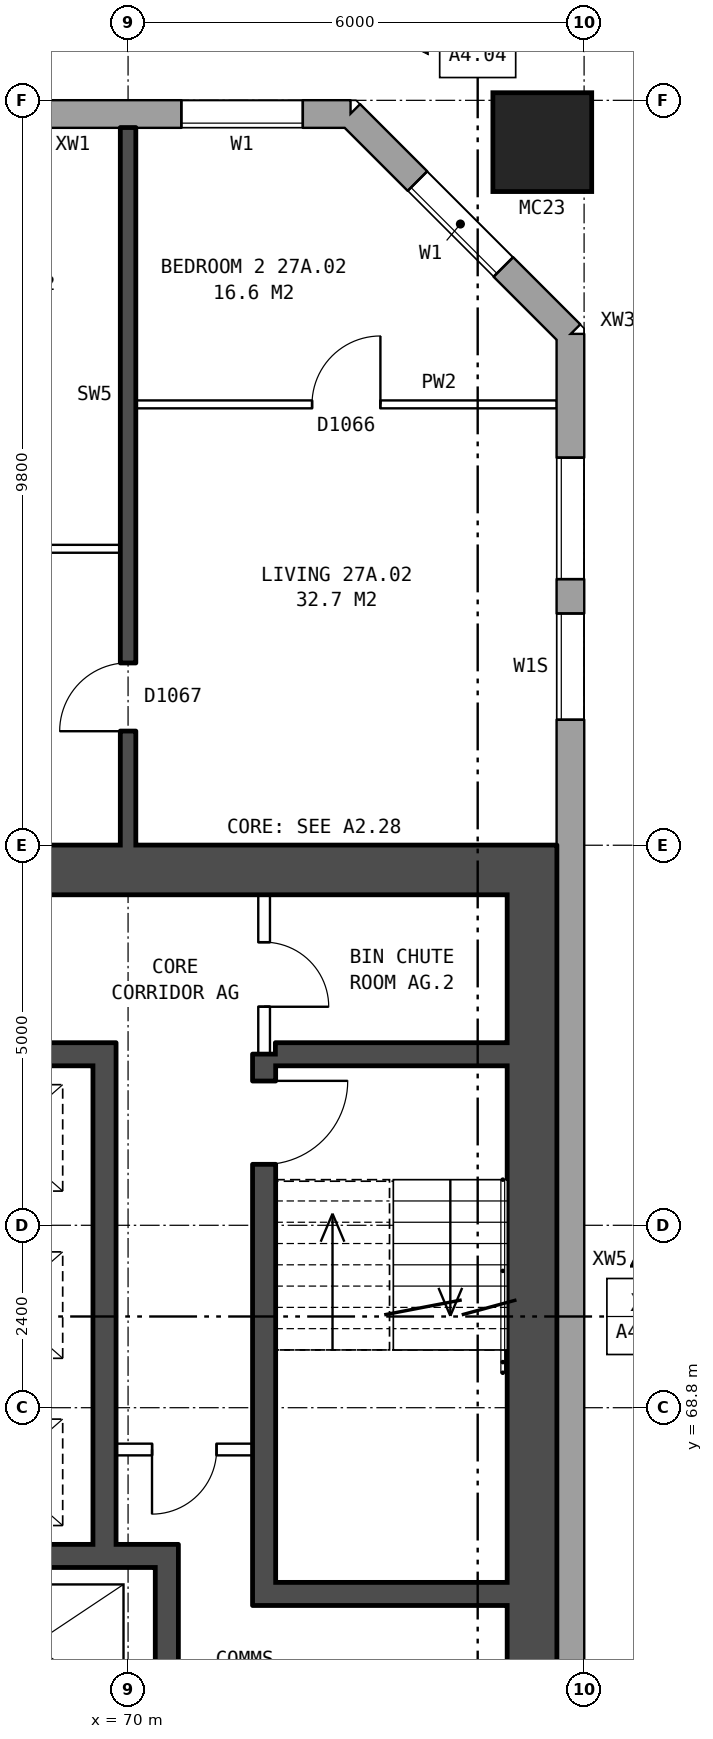
"""IFC4 building model, lengths in metres.
Left out: names, types, materials, properties, quantities, classifications, styles, units other than length and angle.
Written with IfcOpenShell. Run it as: python <this file> out.ifc"""

import sys

from ifc_helpers import new_model, si_unit, direction, frame, frame_2d, origin, origin_2d, place, context, subcontext, project, spatial, rectangle, hollow_rectangle, extrude, element, fill, save


model = new_model("IFC4")
c1 = context("Model", 3, precision=1e-05, world=origin(), true_north=direction((0.0, 1.0)))
c2 = subcontext(c1, "Body", "Model", "MODEL_VIEW")
j1 = project(units=[si_unit("LENGTHUNIT", "METRE"), si_unit("PLANEANGLEUNIT", "RADIAN")], contexts=[c1])
p1 = place(None, origin())
s1 = spatial("IfcSite", under=j1, at=p1, CompositionType="ELEMENT")
p2 = place(p1, origin())
s2 = spatial("IfcBuilding", under=s1, at=p2, CompositionType="ELEMENT")
p3 = place(p2, frame((0.0, 0.0, 99.5)))
s3 = spatial("IfcBuildingStorey", under=s2, at=p3, CompositionType="ELEMENT", Elevation=99.5)
p4 = place(p3, frame((75.45, 85.45, 0.0), z_axis=(0.0, 0.0, 1.0), x_axis=(1.0, 0.0, 0.0)))
e1 = element("IfcColumn", 1, at=p4, inside=s3, PredefinedType="COLUMN", context=c2, shape_type="SweptSolid", body=[
    extrude(hollow_rectangle(XDim=1.3, YDim=1.3, WallThickness=0.07, at=origin_2d()), origin(), (0.0, 0.0, 1.0), 3.1),
])
p5 = place(p3, frame((75.82, 57.075, 0.0), z_axis=(0.0, 0.0, 1.0), x_axis=(0.0, 1.0, 0.0)))
e2 = element("IfcWall", 2, at=p5, inside=s3, PredefinedType="STANDARD", context=c2, shape_type="SweptSolid", body=[
    extrude(rectangle(XDim=25.851, YDim=0.36, at=frame_2d((12.925, 0.0))), origin(), (0.0, 0.0, 1.0), 2.85),
])
p6 = place(p5, frame((1.625, 0.0, 0.8)))
e3 = element("IfcOpeningElement", 3, at=p6, cuts=e2, PredefinedType="OPENING", context=c2, shape_type="SweptSolid", body=[
    extrude(rectangle(XDim=1.6, YDim=1.8, at=frame_2d((0.8, 0.9))), frame((0.0, 0.19, 0.0), z_axis=(0.0, -1.0, 0.0), x_axis=(1.0, 0.0, 0.0)), (0.0, 0.0, 1.0), 0.38),
])
p7 = place(p5, frame((4.075, 0.0, 1.65)))
e4 = element("IfcOpeningElement", 4, at=p7, cuts=e2, PredefinedType="OPENING", context=c2, shape_type="SweptSolid", body=[
    extrude(rectangle(XDim=0.8, YDim=0.9, at=frame_2d((0.4, 0.45))), frame((0.0, 0.19, 0.0), z_axis=(0.0, -1.0, 0.0), x_axis=(1.0, 0.0, 0.0)), (0.0, 0.0, 1.0), 0.38),
])
p8 = place(p5, frame((20.775, 0.0, 1.7)))
e5 = element("IfcOpeningElement", 5, at=p8, cuts=e2, PredefinedType="OPENING", context=c2, shape_type="SweptSolid", body=[
    extrude(rectangle(XDim=1.4, YDim=0.9, at=frame_2d((0.7, 0.45))), frame((0.0, 0.19, 0.0), z_axis=(0.0, -1.0, 0.0), x_axis=(1.0, 0.0, 0.0)), (0.0, 0.0, 1.0), 0.38),
])
p9 = place(p5, frame((22.625, 0.0, 0.8)))
e6 = element("IfcOpeningElement", 6, at=p9, cuts=e2, PredefinedType="OPENING", context=c2, shape_type="SweptSolid", body=[
    extrude(rectangle(XDim=1.6, YDim=1.8, at=frame_2d((0.8, 0.9))), frame((0.0, 0.19, 0.0), z_axis=(0.0, -1.0, 0.0), x_axis=(1.0, 0.0, 0.0)), (0.0, 0.0, 1.0), 0.38),
])
p10 = place(p5, frame((5.575, 0.0, 0.45)))
e7 = element("IfcOpeningElement", 7, at=p10, cuts=e2, PredefinedType="OPENING", context=c2, shape_type="SweptSolid", body=[
    extrude(rectangle(XDim=1.0, YDim=0.9, at=frame_2d((0.5, 0.45))), frame((0.0, 0.19, 0.0), z_axis=(0.0, -1.0, 0.0), x_axis=(1.0, 0.0, 0.0)), (0.0, 0.0, 1.0), 0.38),
])
p11 = place(p3, frame((75.82, 82.925, 0.0), z_axis=(0.0, 0.0, 1.0), x_axis=(-0.707106781187, 0.707106781187, 0.0)))
e8 = element("IfcWall", 8, at=p11, inside=s3, PredefinedType="STANDARD", context=c2, shape_type="SweptSolid", body=[
    extrude(rectangle(XDim=4.094, YDim=0.36, at=frame_2d((2.047, 0.0))), origin(), (0.0, 0.0, 1.0), 2.85),
])
p12 = place(p11, frame((1.247, 0.0, 0.8)))
e9 = element("IfcOpeningElement", 9, at=p12, cuts=e8, PredefinedType="OPENING", context=c2, shape_type="SweptSolid", body=[
    extrude(rectangle(XDim=1.6, YDim=1.8, at=frame_2d((0.8, 0.9))), frame((0.0, 0.19, 0.0), z_axis=(0.0, -1.0, 0.0), x_axis=(1.0, 0.0, 0.0)), (0.0, 0.0, 1.0), 0.38),
])
p13 = place(p3, frame((72.925, 85.82, 0.0), z_axis=(0.0, 0.0, 1.0), x_axis=(-1.0, 0.0, 0.0)))
e10 = element("IfcWall", 10, at=p13, inside=s3, PredefinedType="STANDARD", context=c2, shape_type="SweptSolid", body=[
    extrude(rectangle(XDim=44.851, YDim=0.36, at=frame_2d((22.425, 0.0))), origin(), (0.0, 0.0, 1.0), 2.85),
])
p14 = place(p13, frame((0.625, 0.0, 0.8)))
e11 = element("IfcOpeningElement", 11, at=p14, cuts=e10, PredefinedType="OPENING", context=c2, shape_type="SweptSolid", body=[
    extrude(rectangle(XDim=1.6, YDim=1.8, at=frame_2d((0.8, 0.9))), frame((0.0, 0.19, 0.0), z_axis=(0.0, -1.0, 0.0), x_axis=(1.0, 0.0, 0.0)), (0.0, 0.0, 1.0), 0.38),
])
p15 = place(p13, frame((5.075, 0.0, 0.8)))
e12 = element("IfcOpeningElement", 12, at=p15, cuts=e10, PredefinedType="OPENING", context=c2, shape_type="SweptSolid", body=[
    extrude(rectangle(XDim=1.2, YDim=1.2, at=frame_2d((0.6, 0.6))), frame((0.0, 0.19, 0.0), z_axis=(0.0, -1.0, 0.0), x_axis=(1.0, 0.0, 0.0)), (0.0, 0.0, 1.0), 0.38),
])
p16 = place(p13, frame((6.625, 0.0, 0.8)))
e13 = element("IfcOpeningElement", 13, at=p16, cuts=e10, PredefinedType="OPENING", context=c2, shape_type="SweptSolid", body=[
    extrude(rectangle(XDim=1.6, YDim=1.8, at=frame_2d((0.8, 0.9))), frame((0.0, 0.19, 0.0), z_axis=(0.0, -1.0, 0.0), x_axis=(1.0, 0.0, 0.0)), (0.0, 0.0, 1.0), 0.38),
])
p17 = place(p13, frame((9.625, 0.0, 0.8)))
e14 = element("IfcOpeningElement", 14, at=p17, cuts=e10, PredefinedType="OPENING", context=c2, shape_type="SweptSolid", body=[
    extrude(rectangle(XDim=1.6, YDim=1.8, at=frame_2d((0.8, 0.9))), frame((0.0, 0.19, 0.0), z_axis=(0.0, -1.0, 0.0), x_axis=(1.0, 0.0, 0.0)), (0.0, 0.0, 1.0), 0.38),
])
p18 = place(p13, frame((12.625, 0.0, 0.8)))
e15 = element("IfcOpeningElement", 15, at=p18, cuts=e10, PredefinedType="OPENING", context=c2, shape_type="SweptSolid", body=[
    extrude(rectangle(XDim=1.6, YDim=1.8, at=frame_2d((0.8, 0.9))), frame((0.0, 0.19, 0.0), z_axis=(0.0, -1.0, 0.0), x_axis=(1.0, 0.0, 0.0)), (0.0, 0.0, 1.0), 0.38),
])
p19 = place(p13, frame((15.625, 0.0, 0.8)))
e16 = element("IfcOpeningElement", 16, at=p19, cuts=e10, PredefinedType="OPENING", context=c2, shape_type="SweptSolid", body=[
    extrude(rectangle(XDim=1.6, YDim=1.8, at=frame_2d((0.8, 0.9))), frame((0.0, 0.19, 0.0), z_axis=(0.0, -1.0, 0.0), x_axis=(1.0, 0.0, 0.0)), (0.0, 0.0, 1.0), 0.38),
])
p20 = place(p13, frame((18.625, 0.0, 0.8)))
e17 = element("IfcOpeningElement", 17, at=p20, cuts=e10, PredefinedType="OPENING", context=c2, shape_type="SweptSolid", body=[
    extrude(rectangle(XDim=1.6, YDim=1.8, at=frame_2d((0.8, 0.9))), frame((0.0, 0.19, 0.0), z_axis=(0.0, -1.0, 0.0), x_axis=(1.0, 0.0, 0.0)), (0.0, 0.0, 1.0), 0.38),
])
p21 = place(p13, frame((21.625, 0.0, 0.8)))
e18 = element("IfcOpeningElement", 18, at=p21, cuts=e10, PredefinedType="OPENING", context=c2, shape_type="SweptSolid", body=[
    extrude(rectangle(XDim=1.6, YDim=1.8, at=frame_2d((0.8, 0.9))), frame((0.0, 0.19, 0.0), z_axis=(0.0, -1.0, 0.0), x_axis=(1.0, 0.0, 0.0)), (0.0, 0.0, 1.0), 0.38),
])
p22 = place(p13, frame((24.625, 0.0, 0.8)))
e19 = element("IfcOpeningElement", 19, at=p22, cuts=e10, PredefinedType="OPENING", context=c2, shape_type="SweptSolid", body=[
    extrude(rectangle(XDim=1.6, YDim=1.8, at=frame_2d((0.8, 0.9))), frame((0.0, 0.19, 0.0), z_axis=(0.0, -1.0, 0.0), x_axis=(1.0, 0.0, 0.0)), (0.0, 0.0, 1.0), 0.38),
])
p23 = place(p13, frame((27.625, 0.0, 0.8)))
e20 = element("IfcOpeningElement", 20, at=p23, cuts=e10, PredefinedType="OPENING", context=c2, shape_type="SweptSolid", body=[
    extrude(rectangle(XDim=1.6, YDim=1.8, at=frame_2d((0.8, 0.9))), frame((0.0, 0.19, 0.0), z_axis=(0.0, -1.0, 0.0), x_axis=(1.0, 0.0, 0.0)), (0.0, 0.0, 1.0), 0.38),
])
p24 = place(p13, frame((30.625, 0.0, 0.8)))
e21 = element("IfcOpeningElement", 21, at=p24, cuts=e10, PredefinedType="OPENING", context=c2, shape_type="SweptSolid", body=[
    extrude(rectangle(XDim=1.6, YDim=1.8, at=frame_2d((0.8, 0.9))), frame((0.0, 0.19, 0.0), z_axis=(0.0, -1.0, 0.0), x_axis=(1.0, 0.0, 0.0)), (0.0, 0.0, 1.0), 0.38),
])
p25 = place(p13, frame((33.625, 0.0, 0.8)))
e22 = element("IfcOpeningElement", 22, at=p25, cuts=e10, PredefinedType="OPENING", context=c2, shape_type="SweptSolid", body=[
    extrude(rectangle(XDim=1.6, YDim=1.8, at=frame_2d((0.8, 0.9))), frame((0.0, 0.19, 0.0), z_axis=(0.0, -1.0, 0.0), x_axis=(1.0, 0.0, 0.0)), (0.0, 0.0, 1.0), 0.38),
])
p26 = place(p13, frame((36.625, 0.0, 0.8)))
e23 = element("IfcOpeningElement", 23, at=p26, cuts=e10, PredefinedType="OPENING", context=c2, shape_type="SweptSolid", body=[
    extrude(rectangle(XDim=1.6, YDim=1.8, at=frame_2d((0.8, 0.9))), frame((0.0, 0.19, 0.0), z_axis=(0.0, -1.0, 0.0), x_axis=(1.0, 0.0, 0.0)), (0.0, 0.0, 1.0), 0.38),
])
p27 = place(p13, frame((39.125, 0.0, 0.8)))
e24 = element("IfcOpeningElement", 24, at=p27, cuts=e10, PredefinedType="OPENING", context=c2, shape_type="SweptSolid", body=[
    extrude(rectangle(XDim=1.0, YDim=0.9, at=frame_2d((0.5, 0.45))), frame((0.0, 0.19, 0.0), z_axis=(0.0, -1.0, 0.0), x_axis=(1.0, 0.0, 0.0)), (0.0, 0.0, 1.0), 0.38),
])
p28 = place(p13, frame((42.625, 0.0, 0.8)))
e25 = element("IfcOpeningElement", 25, at=p28, cuts=e10, PredefinedType="OPENING", context=c2, shape_type="SweptSolid", body=[
    extrude(rectangle(XDim=1.6, YDim=1.8, at=frame_2d((0.8, 0.9))), frame((0.0, 0.19, 0.0), z_axis=(0.0, -1.0, 0.0), x_axis=(1.0, 0.0, 0.0)), (0.0, 0.0, 1.0), 0.38),
])
p29 = place(p13, frame((41.425, 0.0, 1.7)))
e26 = element("IfcOpeningElement", 26, at=p29, cuts=e10, PredefinedType="OPENING", context=c2, shape_type="SweptSolid", body=[
    extrude(rectangle(XDim=0.8, YDim=0.9, at=frame_2d((0.4, 0.45))), frame((0.0, 0.19, 0.0), z_axis=(0.0, -1.0, 0.0), x_axis=(1.0, 0.0, 0.0)), (0.0, 0.0, 1.0), 0.38),
])
p30 = place(p3, frame((75.315, 64.45, 0.0), z_axis=(0.0, 0.0, 1.0), x_axis=(0.0, 1.0, 0.0)))
e27 = element("IfcWall", 27, at=p30, inside=s3, PredefinedType="SHEAR", context=c2, shape_type="SweptSolid", body=[
    extrude(rectangle(XDim=11.1, YDim=0.65, at=frame_2d((5.55, 0.0))), origin(), (0.0, 0.0, 1.0), 2.85),
])
p31 = place(p3, frame((66.64, 75.875, 0.0), z_axis=(0.0, 0.0, 1.0), x_axis=(1.0, 0.0, 0.0)))
e28 = element("IfcWall", 28, at=p31, inside=s3, PredefinedType="SHEAR", context=c2, shape_type="SweptSolid", body=[
    extrude(rectangle(XDim=9.0, YDim=0.65, at=frame_2d((4.5, 0.0))), origin(), (0.0, 0.0, 1.0), 2.85),
])
p32 = place(p3, frame((71.94, 66.35, 0.0), z_axis=(0.0, 0.0, 1.0), x_axis=(1.0, 0.0, 0.0)))
e29 = element("IfcWall", 29, at=p32, inside=s3, PredefinedType="SHEAR", context=c2, shape_type="SweptSolid", body=[
    extrude(rectangle(XDim=3.05, YDim=0.3, at=frame_2d((1.525, 0.0))), origin(), (0.0, 0.0, 1.0), 2.85),
])
p33 = place(p3, frame((67.29, 66.85, 0.0), z_axis=(0.0, 0.0, 1.0), x_axis=(1.0, 0.0, 0.0)))
e30 = element("IfcWall", 30, at=p33, inside=s3, PredefinedType="SHEAR", context=c2, shape_type="SweptSolid", body=[
    extrude(rectangle(XDim=3.37, YDim=0.3, at=frame_2d((1.685, 0.0))), origin(), (0.0, 0.0, 1.0), 2.85),
])
p34 = place(p3, frame((69.84, 68.25, 0.0), z_axis=(0.0, 0.0, 1.0), x_axis=(1.0, 0.0, 0.0)))
e31 = element("IfcWall", 31, at=p34, inside=s3, PredefinedType="PARTITIONING", context=c2, shape_type="SweptSolid", body=[
    extrude(rectangle(XDim=1.8, YDim=0.15, at=frame_2d((0.9, 0.0))), origin(), (0.0, 0.0, 1.0), 2.85),
])
p35 = place(p34, frame((0.475, 0.0, 0.0)))
e32 = element("IfcOpeningElement", 32, at=p35, cuts=e31, PredefinedType="OPENING", context=c2, shape_type="SweptSolid", body=[
    extrude(rectangle(XDim=0.85, YDim=2.1, at=frame_2d((0.425, 1.05))), frame((0.0, 0.085, 0.0), z_axis=(0.0, -1.0, 0.0), x_axis=(1.0, 0.0, 0.0)), (0.0, 0.0, 1.0), 0.17),
])
p36 = place(p3, frame((67.29, 73.45, 0.0), z_axis=(0.0, 0.0, 1.0), x_axis=(1.0, 0.0, 0.0)))
e33 = element("IfcWall", 33, at=p36, inside=s3, PredefinedType="SHEAR", context=c2, shape_type="SweptSolid", body=[
    extrude(rectangle(XDim=2.25, YDim=0.3, at=frame_2d((1.125, 0.0))), origin(), (0.0, 0.0, 1.0), 2.85),
])
p37 = place(p3, frame((71.94, 73.45, 0.0), z_axis=(0.0, 0.0, 1.0), x_axis=(1.0, 0.0, 0.0)))
e34 = element("IfcWall", 34, at=p37, inside=s3, PredefinedType="SHEAR", context=c2, shape_type="SweptSolid", body=[
    extrude(rectangle(XDim=3.05, YDim=0.3, at=frame_2d((1.525, 0.0))), origin(), (0.0, 0.0, 1.0), 2.85),
])
p38 = place(p3, frame((69.69, 67.0, 0.0), z_axis=(0.0, 0.0, 1.0), x_axis=(0.0, 1.0, 0.0)))
e35 = element("IfcWall", 35, at=p38, inside=s3, PredefinedType="SHEAR", context=c2, shape_type="SweptSolid", body=[
    extrude(rectangle(XDim=6.6, YDim=0.3, at=frame_2d((3.3, 0.0))), origin(), (0.0, 0.0, 1.0), 2.85),
])
p39 = place(p3, frame((70.51, 64.45, 0.0), z_axis=(0.0, 0.0, 1.0), x_axis=(0.0, 1.0, 0.0)))
e36 = element("IfcWall", 36, at=p39, inside=s3, PredefinedType="SHEAR", context=c2, shape_type="SweptSolid", body=[
    extrude(rectangle(XDim=2.25, YDim=0.3, at=frame_2d((1.125, 0.0))), origin(), (0.0, 0.0, 1.0), 2.85),
])
p40 = place(p3, frame((71.79, 66.2, 0.0), z_axis=(0.0, 0.0, 1.0), x_axis=(0.0, 1.0, 0.0)))
e37 = element("IfcWall", 37, at=p40, inside=s3, PredefinedType="SHEAR", context=c2, shape_type="SweptSolid", body=[
    extrude(rectangle(XDim=7.25, YDim=0.3, at=frame_2d((3.625, 0.0))), origin(), (0.0, 0.0, 1.0), 2.85),
])
p41 = place(p40, frame((5.8, 0.0, 0.0)))
e38 = element("IfcOpeningElement", 38, at=p41, cuts=e37, PredefinedType="OPENING", context=c2, shape_type="SweptSolid", body=[
    extrude(rectangle(XDim=1.1, YDim=2.1, at=frame_2d((0.55, 1.05))), frame((0.0, 0.16, 0.0), z_axis=(0.0, -1.0, 0.0), x_axis=(1.0, 0.0, 0.0)), (0.0, 0.0, 1.0), 0.32),
])
p42 = place(p3, frame((71.79, 73.45, 0.0), z_axis=(0.0, 0.0, 1.0), x_axis=(0.0, 1.0, 0.0)))
e39 = element("IfcWall", 39, at=p42, inside=s3, PredefinedType="PARTITIONING", context=c2, shape_type="SweptSolid", body=[
    extrude(rectangle(XDim=2.1, YDim=0.15, at=frame_2d((1.05, 0.0))), origin(), (0.0, 0.0, 1.0), 2.85),
])
p43 = place(p42, frame((0.625, 0.0, 0.0)))
e40 = element("IfcOpeningElement", 40, at=p43, cuts=e39, PredefinedType="OPENING", context=c2, shape_type="SweptSolid", body=[
    extrude(rectangle(XDim=0.85, YDim=2.1, at=frame_2d((0.425, 1.05))), frame((0.0, 0.085, 0.0), z_axis=(0.0, -1.0, 0.0), x_axis=(1.0, 0.0, 0.0)), (0.0, 0.0, 1.0), 0.17),
])
p44 = place(p3, frame((64.1, 80.1, 0.0), z_axis=(0.0, 0.0, 1.0), x_axis=(1.0, 0.0, 0.0)))
e41 = element("IfcWall", 41, at=p44, inside=s3, PredefinedType="PARTITIONING", context=c2, shape_type="SweptSolid", body=[
    extrude(rectangle(XDim=5.8, YDim=0.1, at=frame_2d((2.9, 0.0))), origin(), (0.0, 0.0, 1.0), 2.85),
])
p45 = place(p44, frame((3.6, 0.0, 0.0)))
e42 = element("IfcOpeningElement", 42, at=p45, cuts=e41, PredefinedType="OPENING", context=c2, shape_type="SweptSolid", body=[
    extrude(rectangle(XDim=0.9, YDim=2.1, at=frame_2d((0.45, 1.05))), frame((0.0, 0.06, 0.0), z_axis=(0.0, -1.0, 0.0), x_axis=(1.0, 0.0, 0.0)), (0.0, 0.0, 1.0), 0.12),
])
p46 = place(p44, frame((0.7, 0.0, 0.0)))
e43 = element("IfcOpeningElement", 43, at=p46, cuts=e41, PredefinedType="OPENING", context=c2, shape_type="SweptSolid", body=[
    extrude(rectangle(XDim=0.9, YDim=2.1, at=frame_2d((0.45, 1.05))), frame((0.0, 0.06, 0.0), z_axis=(0.0, -1.0, 0.0), x_axis=(1.0, 0.0, 0.0)), (0.0, 0.0, 1.0), 0.12),
])
p47 = place(p3, frame((70.1, 82.0, 0.0), z_axis=(0.0, 0.0, 1.0), x_axis=(1.0, 0.0, 0.0)))
e44 = element("IfcWall", 44, at=p47, inside=s3, PredefinedType="PARTITIONING", context=c2, shape_type="SweptSolid", body=[
    extrude(rectangle(XDim=5.54, YDim=0.1, at=frame_2d((2.77, 0.0))), origin(), (0.0, 0.0, 1.0), 2.85),
])
p48 = place(p47, frame((2.32, 0.0, 0.0)))
e45 = element("IfcOpeningElement", 45, at=p48, cuts=e44, PredefinedType="OPENING", context=c2, shape_type="SweptSolid", body=[
    extrude(rectangle(XDim=0.9, YDim=2.1, at=frame_2d((0.45, 1.05))), frame((0.0, 0.06, 0.0), z_axis=(0.0, -1.0, 0.0), x_axis=(1.0, 0.0, 0.0)), (0.0, 0.0, 1.0), 0.12),
])
p49 = place(p3, frame((70.0, 76.2, 0.0), z_axis=(0.0, 0.0, 1.0), x_axis=(0.0, 1.0, 0.0)))
e46 = element("IfcWall", 46, at=p49, inside=s3, PredefinedType="SOLIDWALL", context=c2, shape_type="SweptSolid", body=[
    extrude(rectangle(XDim=9.44, YDim=0.2, at=frame_2d((4.72, 0.0))), origin(), (0.0, 0.0, 1.0), 2.85),
])
p50 = place(p49, frame((1.5, 0.0, 0.0)))
e47 = element("IfcOpeningElement", 47, at=p50, cuts=e46, PredefinedType="OPENING", context=c2, shape_type="SweptSolid", body=[
    extrude(rectangle(XDim=0.9, YDim=2.1, at=frame_2d((0.45, 1.05))), frame((0.0, 0.11, 0.0), z_axis=(0.0, -1.0, 0.0), x_axis=(1.0, 0.0, 0.0)), (0.0, 0.0, 1.0), 0.22),
])
p51 = place(p8, origin())
e48 = element("IfcWindow", 48, at=p51, inside=s3, PartitioningType="SINGLE_PANEL", PredefinedType="WINDOW", context=c2, shape_type="SweptSolid", body=[
    extrude(rectangle(XDim=1.4, YDim=0.9, at=frame_2d((0.7, 0.45))), frame((0.0, 0.15, 0.0), z_axis=(0.0, -1.0, 0.0), x_axis=(1.0, 0.0, 0.0)), (0.0, 0.0, 1.0), 0.06),
])
fill(e5, e48)
p52 = place(p9, origin())
e49 = element("IfcWindow", 49, at=p52, inside=s3, PartitioningType="SINGLE_PANEL", PredefinedType="WINDOW", context=c2, shape_type="SweptSolid", body=[
    extrude(rectangle(XDim=1.6, YDim=1.8, at=frame_2d((0.8, 0.9))), frame((0.0, 0.15, 0.0), z_axis=(0.0, -1.0, 0.0), x_axis=(1.0, 0.0, 0.0)), (0.0, 0.0, 1.0), 0.06),
])
fill(e6, e49)
p53 = place(p12, origin())
e50 = element("IfcWindow", 50, at=p53, inside=s3, PartitioningType="SINGLE_PANEL", PredefinedType="WINDOW", context=c2, shape_type="SweptSolid", body=[
    extrude(rectangle(XDim=1.6, YDim=1.8, at=frame_2d((0.8, 0.9))), frame((0.0, 0.15, 0.0), z_axis=(0.0, -1.0, 0.0), x_axis=(1.0, 0.0, 0.0)), (0.0, 0.0, 1.0), 0.06),
])
fill(e9, e50)
p54 = place(p14, origin())
e51 = element("IfcWindow", 51, at=p54, inside=s3, PartitioningType="SINGLE_PANEL", PredefinedType="WINDOW", context=c2, shape_type="SweptSolid", body=[
    extrude(rectangle(XDim=1.6, YDim=1.8, at=frame_2d((0.8, 0.9))), frame((0.0, 0.15, 0.0), z_axis=(0.0, -1.0, 0.0), x_axis=(1.0, 0.0, 0.0)), (0.0, 0.0, 1.0), 0.06),
])
fill(e11, e51)
p55 = place(p41, frame((1.1, 0.0, 0.0), z_axis=(0.0, 0.0, 1.0), x_axis=(-1.0, 0.0, 0.0)))
e52 = element("IfcDoor", 52, at=p55, inside=s3, OperationType="SINGLE_SWING_LEFT", PredefinedType="DOOR", context=c2, shape_type="SweptSolid", body=[
    extrude(rectangle(XDim=1.1, YDim=2.1, at=frame_2d((0.55, 1.05))), frame((0.0, 0.025, 0.0), z_axis=(0.0, -1.0, 0.0), x_axis=(1.0, 0.0, 0.0)), (0.0, 0.0, 1.0), 0.05),
])
fill(e38, e52)
p56 = place(p35, frame((0.85, 0.0, 0.0), z_axis=(0.0, 0.0, 1.0), x_axis=(-1.0, 0.0, 0.0)))
e53 = element("IfcDoor", 53, at=p56, inside=s3, OperationType="SINGLE_SWING_RIGHT", PredefinedType="DOOR", context=c2, shape_type="SweptSolid", body=[
    extrude(rectangle(XDim=0.85, YDim=2.1, at=frame_2d((0.425, 1.05))), frame((0.0, 0.025, 0.0), z_axis=(0.0, -1.0, 0.0), x_axis=(1.0, 0.0, 0.0)), (0.0, 0.0, 1.0), 0.05),
])
fill(e32, e53)
p57 = place(p43, frame((0.85, 0.0, 0.0), z_axis=(0.0, 0.0, 1.0), x_axis=(-1.0, 0.0, 0.0)))
e54 = element("IfcDoor", 54, at=p57, inside=s3, OperationType="SINGLE_SWING_RIGHT", PredefinedType="DOOR", context=c2, shape_type="SweptSolid", body=[
    extrude(rectangle(XDim=0.85, YDim=2.1, at=frame_2d((0.425, 1.05))), frame((0.0, 0.025, 0.0), z_axis=(0.0, -1.0, 0.0), x_axis=(1.0, 0.0, 0.0)), (0.0, 0.0, 1.0), 0.05),
])
fill(e40, e54)
p58 = place(p48, origin())
e55 = element("IfcDoor", 55, at=p58, inside=s3, OperationType="SINGLE_SWING_RIGHT", PredefinedType="DOOR", context=c2, shape_type="SweptSolid", body=[
    extrude(rectangle(XDim=0.9, YDim=2.1, at=frame_2d((0.45, 1.05))), frame((0.0, 0.025, 0.0), z_axis=(0.0, -1.0, 0.0), x_axis=(1.0, 0.0, 0.0)), (0.0, 0.0, 1.0), 0.05),
])
fill(e45, e55)
p59 = place(p50, origin())
e56 = element("IfcDoor", 56, at=p59, inside=s3, OperationType="SINGLE_SWING_LEFT", PredefinedType="DOOR", context=c2, shape_type="SweptSolid", body=[
    extrude(rectangle(XDim=0.9, YDim=2.1, at=frame_2d((0.45, 1.05))), frame((0.0, 0.025, 0.0), z_axis=(0.0, -1.0, 0.0), x_axis=(1.0, 0.0, 0.0)), (0.0, 0.0, 1.0), 0.05),
])
fill(e47, e56)
save(model, sys.argv[1])
